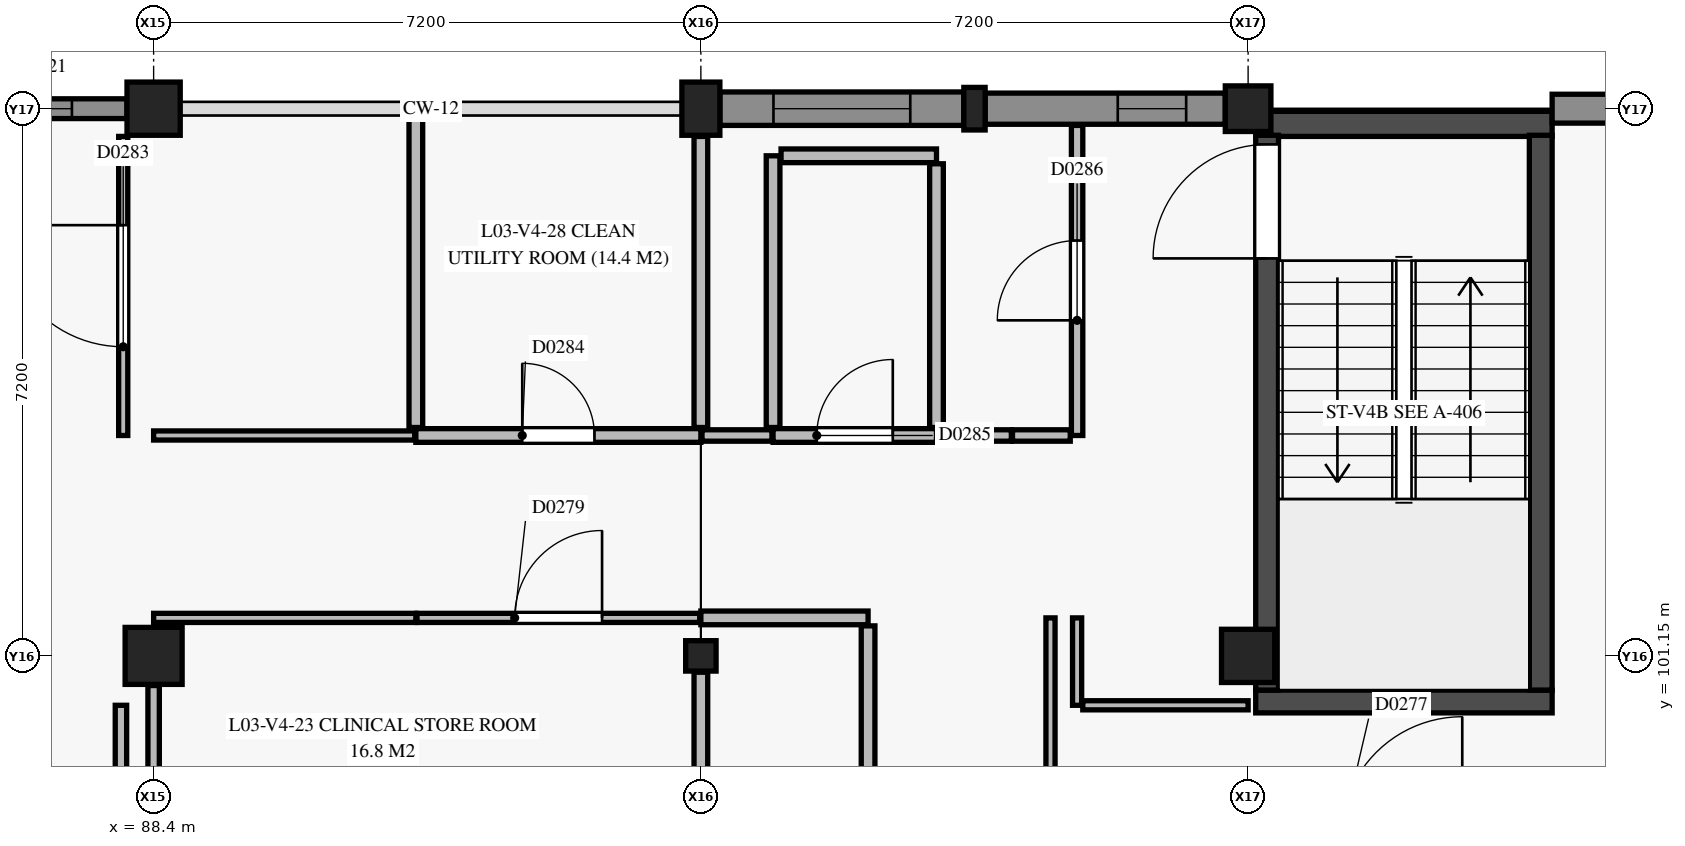
"""IFC4 building model, lengths in metres.
Left out: names, types, materials, properties, quantities, classifications, styles, units other than length and angle.
Written with IfcOpenShell. Run it as: python <this file> out.ifc"""

import sys

from ifc_helpers import new_model, si_unit, direction, frame, frame_2d, origin, origin_2d, place, context, subcontext, project, spatial, rectangle, circle, extrude, element, fill, save


model = new_model("IFC4")
c1 = context("Model", 3, precision=1e-05, world=origin(), true_north=direction((0.0, 1.0)))
c2 = subcontext(c1, "Body", "Model", "MODEL_VIEW")
j1 = project(units=[si_unit("LENGTHUNIT", "METRE"), si_unit("PLANEANGLEUNIT", "RADIAN")], contexts=[c1])
p1 = place(None, origin())
s1 = spatial("IfcSite", under=j1, at=p1, CompositionType="ELEMENT")
p2 = place(p1, origin())
s2 = spatial("IfcBuilding", under=s1, at=p2, CompositionType="ELEMENT")
p3 = place(p2, frame((0.0, 0.0, 13.2)))
s3 = spatial("IfcBuildingStorey", under=s2, at=p3, CompositionType="ELEMENT", Elevation=13.2)
p4 = place(p3, frame((88.4, 101.15, 0.0), z_axis=(0.0, 0.0, 1.0), x_axis=(1.0, 0.0, 0.0)))
e1 = element("IfcColumn", 1, at=p4, inside=s3, PredefinedType="COLUMN", context=c2, shape_type="SweptSolid", body=[
    extrude(rectangle(XDim=0.75, YDim=0.75, at=origin_2d()), origin(), (0.0, 0.0, 1.0), 4.2),
])
p5 = place(p3, frame((88.4, 108.35, 0.0), z_axis=(0.0, 0.0, 1.0), x_axis=(1.0, 0.0, 0.0)))
e2 = element("IfcColumn", 2, at=p5, inside=s3, PredefinedType="COLUMN", context=c2, shape_type="SweptSolid", body=[
    extrude(rectangle(XDim=0.7, YDim=0.7, at=origin_2d()), origin(), (0.0, 0.0, 1.0), 4.2),
])
p6 = place(p3, frame((95.6, 101.15, 0.0), z_axis=(0.0, 0.0, 1.0), x_axis=(1.0, 0.0, 0.0)))
e3 = element("IfcColumn", 3, at=p6, inside=s3, PredefinedType="COLUMN", context=c2, shape_type="SweptSolid", body=[
    extrude(rectangle(XDim=0.4, YDim=0.4, at=origin_2d()), origin(), (0.0, 0.0, 1.0), 4.2),
])
p7 = place(p3, frame((95.6, 108.35, 0.0), z_axis=(0.0, 0.0, 1.0), x_axis=(1.0, 0.0, 0.0)))
e4 = element("IfcColumn", 4, at=p7, inside=s3, PredefinedType="COLUMN", context=c2, shape_type="SweptSolid", body=[
    extrude(rectangle(XDim=0.5, YDim=0.7, at=origin_2d()), origin(), (0.0, 0.0, 1.0), 4.2),
])
p8 = place(p3, frame((102.8, 101.15, 0.0), z_axis=(0.0, 0.0, 1.0), x_axis=(1.0, 0.0, 0.0)))
e5 = element("IfcColumn", 5, at=p8, inside=s3, PredefinedType="COLUMN", context=c2, shape_type="SweptSolid", body=[
    extrude(rectangle(XDim=0.7, YDim=0.7, at=origin_2d()), origin(), (0.0, 0.0, 1.0), 4.2),
])
p9 = place(p3, frame((102.8, 108.35, 0.0), z_axis=(0.0, 0.0, 1.0), x_axis=(1.0, 0.0, 0.0)))
e6 = element("IfcColumn", 6, at=p9, inside=s3, PredefinedType="COLUMN", context=c2, shape_type="SweptSolid", body=[
    extrude(circle(Radius=0.3, at=origin_2d()), origin(), (0.0, 0.0, 1.0), 4.2),
])
p10 = place(p3, frame((99.2, 108.35, 0.0), z_axis=(0.0, 0.0, 1.0), x_axis=(1.0, 0.0, 0.0)))
e7 = element("IfcColumn", 7, at=p10, inside=s3, PredefinedType="PILASTER", context=c2, shape_type="SweptSolid", body=[
    extrude(rectangle(XDim=0.28, YDim=0.56, at=origin_2d()), origin(), (0.0, 0.0, 1.0), 4.2),
])
p11 = place(p3, frame((102.9, 100.55, 0.0), z_axis=(0.0, 0.0, 1.0), x_axis=(1.0, 0.0, 0.0)))
e8 = element("IfcWall", 8, at=p11, inside=s3, PredefinedType="SHEAR", context=c2, shape_type="SweptSolid", body=[
    extrude(rectangle(XDim=3.9, YDim=0.3, at=frame_2d((1.95, 0.0))), origin(), (0.0, 0.0, 1.0), 3.95),
])
p12 = place(p3, frame((102.9, 108.15, 0.0), z_axis=(0.0, 0.0, 1.0), x_axis=(1.0, 0.0, 0.0)))
e9 = element("IfcWall", 9, at=p12, inside=s3, PredefinedType="SHEAR", context=c2, shape_type="SweptSolid", body=[
    extrude(rectangle(XDim=3.9, YDim=0.33, at=frame_2d((1.95, 0.0))), origin(), (0.0, 0.0, 1.0), 3.95),
])
p13 = place(p3, frame((103.05, 100.7, 0.0), z_axis=(0.0, 0.0, 1.0), x_axis=(0.0, 1.0, 0.0)))
e10 = element("IfcWall", 10, at=p13, inside=s3, PredefinedType="SHEAR", context=c2, shape_type="SweptSolid", body=[
    extrude(rectangle(XDim=7.3, YDim=0.3, at=frame_2d((3.65, 0.0))), origin(), (0.0, 0.0, 1.0), 3.95),
])
p14 = place(p13, frame((5.68, 0.0, 0.0)))
e11 = element("IfcOpeningElement", 11, at=p14, cuts=e10, PredefinedType="OPENING", context=c2, shape_type="SweptSolid", body=[
    extrude(rectangle(XDim=1.5, YDim=2.15, at=frame_2d((0.75, 1.075))), frame((0.0, 0.16, 0.0), z_axis=(0.0, -1.0, 0.0), x_axis=(1.0, 0.0, 0.0)), (0.0, 0.0, 1.0), 0.32),
])
p15 = place(p3, frame((106.65, 100.7, 0.0), z_axis=(0.0, 0.0, 1.0), x_axis=(0.0, 1.0, 0.0)))
e12 = element("IfcWall", 12, at=p15, inside=s3, PredefinedType="SHEAR", context=c2, shape_type="SweptSolid", body=[
    extrude(rectangle(XDim=7.3, YDim=0.3, at=frame_2d((3.65, 0.0))), origin(), (0.0, 0.0, 1.0), 3.95),
])
p16 = place(p3, frame((85.7, 108.35, 0.0), z_axis=(0.0, 0.0, 1.0), x_axis=(1.0, 0.0, 0.0)))
e13 = element("IfcWall", 13, at=p16, inside=s3, PredefinedType="SOLIDWALL", context=c2, shape_type="SweptSolid", body=[
    extrude(rectangle(XDim=2.35, YDim=0.26, at=frame_2d((1.175, 0.0))), origin(), (0.0, 0.0, 1.0), 3.13),
])
p17 = place(p16, frame((0.725, 0.0, 0.95)))
e14 = element("IfcOpeningElement", 14, at=p17, cuts=e13, PredefinedType="OPENING", context=c2, shape_type="SweptSolid", body=[
    extrude(rectangle(XDim=0.9, YDim=1.2, at=frame_2d((0.45, 0.6))), frame((0.0, 0.14, 0.0), z_axis=(0.0, -1.0, 0.0), x_axis=(1.0, 0.0, 0.0)), (0.0, 0.0, 1.0), 0.28),
])
p18 = place(p3, frame((95.85, 108.35, 0.0), z_axis=(0.0, 0.0, 1.0), x_axis=(1.0, 0.0, 0.0)))
e15 = element("IfcWall", 15, at=p18, inside=s3, PredefinedType="USERDEFINED", context=c2, shape_type="SweptSolid", body=[
    extrude(rectangle(XDim=3.21, YDim=0.44, at=frame_2d((1.605, 0.0))), origin(), (0.0, 0.0, 1.0), 3.13),
])
p19 = place(p18, frame((0.705, 0.0, 0.9)))
e16 = element("IfcOpeningElement", 16, at=p19, cuts=e15, PredefinedType="OPENING", context=c2, shape_type="SweptSolid", body=[
    extrude(rectangle(XDim=1.8, YDim=1.8, at=frame_2d((0.9, 0.9))), frame((0.0, 0.23, 0.0), z_axis=(0.0, -1.0, 0.0), x_axis=(1.0, 0.0, 0.0)), (0.0, 0.0, 1.0), 0.46),
])
p20 = place(p3, frame((99.34, 108.35, 0.0), z_axis=(0.0, 0.0, 1.0), x_axis=(1.0, 0.0, 0.0)))
e17 = element("IfcWall", 17, at=p20, inside=s3, PredefinedType="USERDEFINED", context=c2, shape_type="SweptSolid", body=[
    extrude(rectangle(XDim=3.16, YDim=0.41, at=frame_2d((1.58, 0.0))), origin(), (0.0, 0.0, 1.0), 3.13),
])
p21 = place(p20, frame((1.745, 0.0, 0.95)))
e18 = element("IfcOpeningElement", 18, at=p21, cuts=e17, PredefinedType="OPENING", context=c2, shape_type="SweptSolid", body=[
    extrude(rectangle(XDim=0.9, YDim=1.2, at=frame_2d((0.45, 0.6))), frame((0.0, 0.215, 0.0), z_axis=(0.0, -1.0, 0.0), x_axis=(1.0, 0.0, 0.0)), (0.0, 0.0, 1.0), 0.43),
])
p22 = place(p3, frame((106.8, 108.35, 0.0), z_axis=(0.0, 0.0, 1.0), x_axis=(1.0, 0.0, 0.0)))
e19 = element("IfcWall", 19, at=p22, inside=s3, PredefinedType="USERDEFINED", context=c2, shape_type="SweptSolid", body=[
    extrude(rectangle(XDim=2.975, YDim=0.38, at=frame_2d((1.487, 0.0))), origin(), (0.0, 0.0, 1.0), 3.13),
])
p23 = place(p22, frame((0.738, 0.0, 0.9)))
e20 = element("IfcOpeningElement", 20, at=p23, cuts=e19, PredefinedType="OPENING", context=c2, shape_type="SweptSolid", body=[
    extrude(rectangle(XDim=1.5, YDim=1.5, at=frame_2d((0.75, 0.75))), frame((0.0, 0.2, 0.0), z_axis=(0.0, -1.0, 0.0), x_axis=(1.0, 0.0, 0.0)), (0.0, 0.0, 1.0), 0.4),
])
p24 = place(p3, frame((96.55, 104.05, 0.0), z_axis=(0.0, 0.0, 1.0), x_axis=(1.0, 0.0, 0.0)))
e21 = element("IfcWall", 21, at=p24, inside=s3, PredefinedType="PLUMBINGWALL", context=c2, shape_type="SweptSolid", body=[
    extrude(rectangle(XDim=2.15, YDim=0.18, at=frame_2d((1.075, 0.0))), origin(), (0.0, 0.0, 1.0), 3.95),
])
p25 = place(p24, frame((0.575, 0.0, 0.0)))
e22 = element("IfcOpeningElement", 22, at=p25, cuts=e21, PredefinedType="OPENING", context=c2, shape_type="SweptSolid", body=[
    extrude(rectangle(XDim=1.0, YDim=2.15, at=frame_2d((0.5, 1.075))), frame((0.0, 0.1, 0.0), z_axis=(0.0, -1.0, 0.0), x_axis=(1.0, 0.0, 0.0)), (0.0, 0.0, 1.0), 0.2),
])
p26 = place(p3, frame((96.55, 104.155, 0.0), z_axis=(0.0, 0.0, 1.0), x_axis=(0.0, 1.0, 0.0)))
e23 = element("IfcWall", 23, at=p26, inside=s3, PredefinedType="PLUMBINGWALL", context=c2, shape_type="SweptSolid", body=[
    extrude(rectangle(XDim=3.575, YDim=0.18, at=frame_2d((1.788, 0.0))), origin(), (0.0, 0.0, 1.0), 3.515),
])
p27 = place(p3, frame((96.655, 107.73, 0.0), z_axis=(0.0, 0.0, 1.0), x_axis=(1.0, 0.0, 0.0)))
e24 = element("IfcWall", 24, at=p27, inside=s3, PredefinedType="PLUMBINGWALL", context=c2, shape_type="SweptSolid", body=[
    extrude(rectangle(XDim=2.045, YDim=0.18, at=frame_2d((1.022, 0.0))), origin(), (0.0, 0.0, 1.0), 3.95),
])
p28 = place(p3, frame((98.7, 104.155, 0.0), z_axis=(0.0, 0.0, 1.0), x_axis=(0.0, 1.0, 0.0)))
e25 = element("IfcWall", 25, at=p28, inside=s3, PredefinedType="PLUMBINGWALL", context=c2, shape_type="SweptSolid", body=[
    extrude(rectangle(XDim=3.47, YDim=0.18, at=frame_2d((1.735, 0.0))), origin(), (0.0, 0.0, 1.0), 3.515),
])
p29 = place(p3, frame((95.6, 101.65, 0.0), z_axis=(0.0, 0.0, 1.0), x_axis=(1.0, 0.0, 0.0)))
e26 = element("IfcWall", 26, at=p29, inside=s3, PredefinedType="PLUMBINGWALL", context=c2, shape_type="SweptSolid", body=[
    extrude(rectangle(XDim=2.2, YDim=0.18, at=frame_2d((1.1, 0.0))), origin(), (0.0, 0.0, 1.0), 3.355),
])
p30 = place(p3, frame((97.8, 94.4, 0.0), z_axis=(0.0, 0.0, 1.0), x_axis=(0.0, 1.0, 0.0)))
e27 = element("IfcWall", 27, at=p30, inside=s3, PredefinedType="PLUMBINGWALL", context=c2, shape_type="SweptSolid", body=[
    extrude(rectangle(XDim=7.145, YDim=0.18, at=frame_2d((3.573, 0.0))), origin(), (0.0, 0.0, 1.0), 3.355),
])
p31 = place(p30, frame((3.097, 0.0, 0.0)))
e28 = element("IfcOpeningElement", 28, at=p31, cuts=e27, PredefinedType="OPENING", context=c2, shape_type="SweptSolid", body=[
    extrude(rectangle(XDim=0.95, YDim=2.1, at=frame_2d((0.475, 1.05))), frame((0.0, 0.1, 0.0), z_axis=(0.0, -1.0, 0.0), x_axis=(1.0, 0.0, 0.0)), (0.0, 0.0, 1.0), 0.2),
])
p32 = place(p3, frame((91.85, 104.05, 0.0), z_axis=(0.0, 0.0, 1.0), x_axis=(1.0, 0.0, 0.0)))
e29 = element("IfcWall", 29, at=p32, inside=s3, PredefinedType="PLUMBINGWALL", context=c2, shape_type="SweptSolid", body=[
    extrude(rectangle(XDim=3.75, YDim=0.18, at=frame_2d((1.875, 0.0))), origin(), (0.0, 0.0, 1.0), 3.355),
])
p33 = place(p32, frame((1.4, 0.0, 0.0)))
e30 = element("IfcOpeningElement", 30, at=p33, cuts=e29, PredefinedType="OPENING", context=c2, shape_type="SweptSolid", body=[
    extrude(rectangle(XDim=0.95, YDim=2.1, at=frame_2d((0.475, 1.05))), frame((0.0, 0.1, 0.0), z_axis=(0.0, -1.0, 0.0), x_axis=(1.0, 0.0, 0.0)), (0.0, 0.0, 1.0), 0.2),
])
p34 = place(p3, frame((87.97, 99.365, 0.0), z_axis=(0.0, 0.0, 1.0), x_axis=(0.0, 1.0, 0.0)))
e31 = element("IfcWall", 31, at=p34, inside=s3, PredefinedType="PARTITIONING", context=c2, shape_type="SweptSolid", body=[
    extrude(rectangle(XDim=1.135, YDim=0.15, at=frame_2d((0.567, 0.0))), origin(), (0.0, 0.0, 1.0), 3.95),
])
p35 = place(p3, frame((100.55, 104.05, 0.0), z_axis=(0.0, 0.0, 1.0), x_axis=(0.0, 1.0, 0.0)))
e32 = element("IfcWall", 32, at=p35, inside=s3, PredefinedType="PARTITIONING", context=c2, shape_type="SweptSolid", body=[
    extrude(rectangle(XDim=4.08, YDim=0.15, at=frame_2d((2.04, 0.0))), origin(), (0.0, 0.0, 1.0), 3.515),
])
p36 = place(p35, frame((1.515, 0.0, 0.0)))
e33 = element("IfcOpeningElement", 33, at=p36, cuts=e32, PredefinedType="OPENING", context=c2, shape_type="SweptSolid", body=[
    extrude(rectangle(XDim=1.05, YDim=2.15, at=frame_2d((0.525, 1.075))), frame((0.0, 0.085, 0.0), z_axis=(0.0, -1.0, 0.0), x_axis=(1.0, 0.0, 0.0)), (0.0, 0.0, 1.0), 0.17),
])
p37 = place(p3, frame((99.7, 104.05, 0.0), z_axis=(0.0, 0.0, 1.0), x_axis=(1.0, 0.0, 0.0)))
e34 = element("IfcWall", 34, at=p37, inside=s3, PredefinedType="PARTITIONING", context=c2, shape_type="SweptSolid", body=[
    extrude(rectangle(XDim=0.76, YDim=0.15, at=frame_2d((0.38, 0.0))), origin(), (0.0, 0.0, 1.0), 3.95),
])
p38 = place(p3, frame((98.715, 104.05, 0.0), z_axis=(0.0, 0.0, 1.0), x_axis=(1.0, 0.0, 0.0)))
e35 = element("IfcWall", 35, at=p38, inside=s3, PredefinedType="PARTITIONING", context=c2, shape_type="SweptSolid", body=[
    extrude(rectangle(XDim=0.97, YDim=0.15, at=frame_2d((0.485, 0.0))), origin(), (0.0, 0.0, 1.0), 3.95),
])
p39 = place(p3, frame((95.615, 104.05, 0.0), z_axis=(0.0, 0.0, 1.0), x_axis=(1.0, 0.0, 0.0)))
e36 = element("IfcWall", 36, at=p39, inside=s3, PredefinedType="PARTITIONING", context=c2, shape_type="SweptSolid", body=[
    extrude(rectangle(XDim=0.92, YDim=0.15, at=frame_2d((0.46, 0.0))), origin(), (0.0, 0.0, 1.0), 3.355),
])
p40 = place(p3, frame((100.55, 100.5, 0.0), z_axis=(0.0, 0.0, 1.0), x_axis=(0.0, 1.0, 0.0)))
e37 = element("IfcWall", 37, at=p40, inside=s3, PredefinedType="PARTITIONING", context=c2, shape_type="SweptSolid", body=[
    extrude(rectangle(XDim=1.15, YDim=0.12, at=frame_2d((0.575, 0.0))), origin(), (0.0, 0.0, 1.0), 3.355),
])
p41 = place(p3, frame((100.625, 100.5, 0.0), z_axis=(0.0, 0.0, 1.0), x_axis=(1.0, 0.0, 0.0)))
e38 = element("IfcWall", 38, at=p41, inside=s3, PredefinedType="PARTITIONING", context=c2, shape_type="SweptSolid", body=[
    extrude(rectangle(XDim=2.175, YDim=0.12, at=frame_2d((1.087, 0.0))), origin(), (0.0, 0.0, 1.0), 3.355),
])
p42 = place(p3, frame((100.2, 98.825, 0.0), z_axis=(0.0, 0.0, 1.0), x_axis=(0.0, 1.0, 0.0)))
e39 = element("IfcWall", 39, at=p42, inside=s3, PredefinedType="PARTITIONING", context=c2, shape_type="SweptSolid", body=[
    extrude(rectangle(XDim=2.825, YDim=0.12, at=frame_2d((1.413, 0.0))), origin(), (0.0, 0.0, 1.0), 3.355),
])
p43 = place(p3, frame((88.4, 101.65, 0.0), z_axis=(0.0, 0.0, 1.0), x_axis=(1.0, 0.0, 0.0)))
e40 = element("IfcWall", 40, at=p43, inside=s3, PredefinedType="PARTITIONING", context=c2, shape_type="SweptSolid", body=[
    extrude(rectangle(XDim=3.45, YDim=0.12, at=frame_2d((1.725, 0.0))), origin(), (0.0, 0.0, 1.0), 3.455),
])
p44 = place(p3, frame((91.865, 101.65, 0.0), z_axis=(0.0, 0.0, 1.0), x_axis=(1.0, 0.0, 0.0)))
e41 = element("IfcWall", 41, at=p44, inside=s3, PredefinedType="PARTITIONING", context=c2, shape_type="SweptSolid", body=[
    extrude(rectangle(XDim=3.72, YDim=0.12, at=frame_2d((1.86, 0.0))), origin(), (0.0, 0.0, 1.0), 3.355),
])
p45 = place(p44, frame((1.285, 0.0, 0.0)))
e42 = element("IfcOpeningElement", 42, at=p45, cuts=e41, PredefinedType="OPENING", context=c2, shape_type="SweptSolid", body=[
    extrude(rectangle(XDim=1.15, YDim=2.15, at=frame_2d((0.575, 1.075))), frame((0.0, 0.07, 0.0), z_axis=(0.0, -1.0, 0.0), x_axis=(1.0, 0.0, 0.0)), (0.0, 0.0, 1.0), 0.14),
])
p46 = place(p3, frame((88.0, 104.05, 0.0), z_axis=(0.0, 0.0, 1.0), x_axis=(0.0, 1.0, 0.0)))
e43 = element("IfcWall", 43, at=p46, inside=s3, PredefinedType="PARTITIONING", context=c2, shape_type="SweptSolid", body=[
    extrude(rectangle(XDim=3.935, YDim=0.12, at=frame_2d((1.968, 0.0))), origin(), (0.0, 0.0, 1.0), 3.95),
])
p47 = place(p46, frame((1.167, 0.0, 0.0)))
e44 = element("IfcOpeningElement", 44, at=p47, cuts=e43, PredefinedType="OPENING", context=c2, shape_type="SweptSolid", body=[
    extrude(rectangle(XDim=1.6, YDim=2.25, at=frame_2d((0.8, 1.125))), frame((0.0, 0.07, 0.0), z_axis=(0.0, -1.0, 0.0), x_axis=(1.0, 0.0, 0.0)), (0.0, 0.0, 1.0), 0.14),
])
p48 = place(p3, frame((88.4, 104.05, 0.0), z_axis=(0.0, 0.0, 1.0), x_axis=(1.0, 0.0, 0.0)))
e45 = element("IfcWall", 45, at=p48, inside=s3, PredefinedType="PARTITIONING", context=c2, shape_type="SweptSolid", body=[
    extrude(rectangle(XDim=3.435, YDim=0.12, at=frame_2d((1.718, 0.0))), origin(), (0.0, 0.0, 1.0), 3.455),
])
p49 = place(p3, frame((95.6, 99.055, 0.0), z_axis=(0.0, 0.0, 1.0), x_axis=(0.0, 1.0, 0.0)))
e46 = element("IfcWall", 46, at=p49, inside=s3, PredefinedType="PLUMBINGWALL", context=c2, shape_type="SweptSolid", body=[
    extrude(rectangle(XDim=1.88, YDim=0.18, at=frame_2d((0.94, 0.0))), origin(), (0.0, 0.0, 1.0), 3.235),
])
p50 = place(p3, frame((91.85, 104.155, 0.0), z_axis=(0.0, 0.0, 1.0), x_axis=(0.0, 1.0, 0.0)))
e47 = element("IfcWall", 47, at=p50, inside=s3, PredefinedType="PLUMBINGWALL", context=c2, shape_type="SweptSolid", body=[
    extrude(rectangle(XDim=4.09, YDim=0.18, at=frame_2d((2.045, 0.0))), origin(), (0.0, 0.0, 1.0), 3.475),
])
p51 = place(p3, frame((95.6, 104.155, 0.0), z_axis=(0.0, 0.0, 1.0), x_axis=(0.0, 1.0, 0.0)))
e48 = element("IfcWall", 48, at=p51, inside=s3, PredefinedType="PLUMBINGWALL", context=c2, shape_type="SweptSolid", body=[
    extrude(rectangle(XDim=3.83, YDim=0.18, at=frame_2d((1.915, 0.0))), origin(), (0.0, 0.0, 1.0), 3.355),
])
p52 = place(p3, frame((88.4, 99.465, 0.0), z_axis=(0.0, 0.0, 1.0), x_axis=(0.0, 1.0, 0.0)))
e49 = element("IfcWall", 49, at=p52, inside=s3, PredefinedType="PARTITIONING", context=c2, shape_type="SweptSolid", body=[
    extrude(rectangle(XDim=1.295, YDim=0.15, at=frame_2d((0.647, 0.0))), origin(), (0.0, 0.0, 1.0), 3.415),
])
p53 = place(p17, origin())
e50 = element("IfcWindow", 50, at=p53, inside=s3, PartitioningType="SINGLE_PANEL", PredefinedType="WINDOW", context=c2, shape_type="SweptSolid", body=[
    extrude(rectangle(XDim=0.9, YDim=1.2, at=frame_2d((0.45, 0.6))), frame((0.0, 0.03, 0.0), z_axis=(0.0, -1.0, 0.0), x_axis=(1.0, 0.0, 0.0)), (0.0, 0.0, 1.0), 0.06),
])
fill(e14, e50)
p54 = place(p19, origin())
e51 = element("IfcWindow", 51, at=p54, inside=s3, PartitioningType="SINGLE_PANEL", PredefinedType="WINDOW", context=c2, shape_type="SweptSolid", body=[
    extrude(rectangle(XDim=1.8, YDim=1.8, at=frame_2d((0.9, 0.9))), frame((0.0, 0.03, 0.0), z_axis=(0.0, -1.0, 0.0), x_axis=(1.0, 0.0, 0.0)), (0.0, 0.0, 1.0), 0.06),
])
fill(e16, e51)
p55 = place(p21, origin())
e52 = element("IfcWindow", 52, at=p55, inside=s3, PartitioningType="SINGLE_PANEL", PredefinedType="WINDOW", context=c2, shape_type="SweptSolid", body=[
    extrude(rectangle(XDim=0.9, YDim=1.2, at=frame_2d((0.45, 0.6))), frame((0.0, 0.03, 0.0), z_axis=(0.0, -1.0, 0.0), x_axis=(1.0, 0.0, 0.0)), (0.0, 0.0, 1.0), 0.06),
])
fill(e18, e52)
p56 = place(p14, origin())
e53 = element("IfcDoor", 53, at=p56, inside=s3, OperationType="SINGLE_SWING_LEFT", PredefinedType="DOOR", context=c2, shape_type="SweptSolid", body=[
    extrude(rectangle(XDim=1.5, YDim=2.15, at=frame_2d((0.75, 1.075))), frame((0.0, 0.025, 0.0), z_axis=(0.0, -1.0, 0.0), x_axis=(1.0, 0.0, 0.0)), (0.0, 0.0, 1.0), 0.05),
])
fill(e11, e53)
p57 = place(p45, origin())
e54 = element("IfcDoor", 54, at=p57, inside=s3, OperationType="SINGLE_SWING_RIGHT", PredefinedType="DOOR", context=c2, shape_type="SweptSolid", body=[
    extrude(rectangle(XDim=1.15, YDim=2.15, at=frame_2d((0.575, 1.075))), frame((0.0, 0.025, 0.0), z_axis=(0.0, -1.0, 0.0), x_axis=(1.0, 0.0, 0.0)), (0.0, 0.0, 1.0), 0.05),
])
fill(e42, e54)
p58 = place(p47, origin())
e55 = element("IfcDoor", 55, at=p58, inside=s3, OperationType="SINGLE_SWING_RIGHT", PredefinedType="DOOR", context=c2, shape_type="SweptSolid", body=[
    extrude(rectangle(XDim=1.6, YDim=2.25, at=frame_2d((0.8, 1.125))), frame((0.0, 0.025, 0.0), z_axis=(0.0, -1.0, 0.0), x_axis=(1.0, 0.0, 0.0)), (0.0, 0.0, 1.0), 0.05),
])
fill(e44, e55)
p59 = place(p33, origin())
e56 = element("IfcDoor", 56, at=p59, inside=s3, OperationType="SINGLE_SWING_LEFT", PredefinedType="DOOR", context=c2, shape_type="SweptSolid", body=[
    extrude(rectangle(XDim=0.95, YDim=2.1, at=frame_2d((0.475, 1.05))), frame((0.0, 0.025, 0.0), z_axis=(0.0, -1.0, 0.0), x_axis=(1.0, 0.0, 0.0)), (0.0, 0.0, 1.0), 0.05),
])
fill(e30, e56)
p60 = place(p25, origin())
e57 = element("IfcDoor", 57, at=p60, inside=s3, OperationType="SINGLE_SWING_RIGHT", PredefinedType="DOOR", context=c2, shape_type="SweptSolid", body=[
    extrude(rectangle(XDim=1.0, YDim=2.15, at=frame_2d((0.5, 1.075))), frame((0.0, 0.025, 0.0), z_axis=(0.0, -1.0, 0.0), x_axis=(1.0, 0.0, 0.0)), (0.0, 0.0, 1.0), 0.05),
])
fill(e22, e57)
p61 = place(p36, origin())
e58 = element("IfcDoor", 58, at=p61, inside=s3, OperationType="SINGLE_SWING_LEFT", PredefinedType="DOOR", context=c2, shape_type="SweptSolid", body=[
    extrude(rectangle(XDim=1.05, YDim=2.15, at=frame_2d((0.525, 1.075))), frame((0.0, 0.025, 0.0), z_axis=(0.0, -1.0, 0.0), x_axis=(1.0, 0.0, 0.0)), (0.0, 0.0, 1.0), 0.05),
])
fill(e33, e58)
save(model, sys.argv[1])
